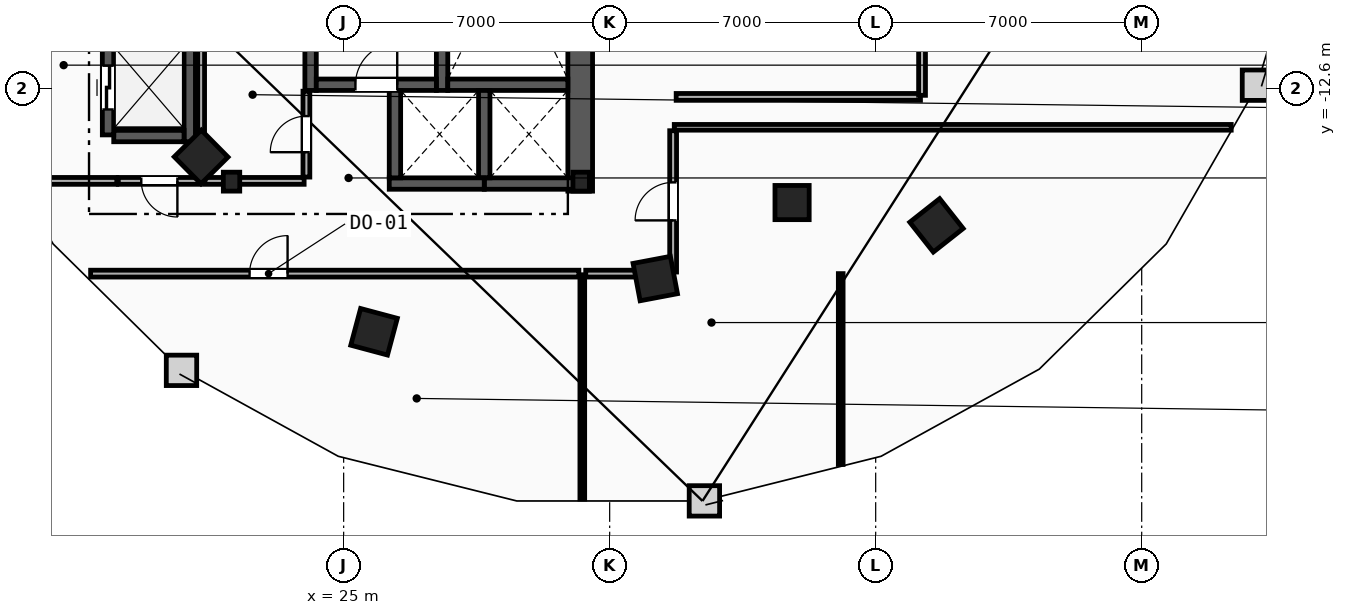
"""IFC4 building model, lengths in metres.
Left out: names, types, materials, properties, quantities, classifications, styles, units other than length and angle.
Written with IfcOpenShell. Run it as: python <this file> out.ifc"""

import sys

from ifc_helpers import new_model, si_unit, direction, frame, frame_2d, origin, origin_2d, place, context, subcontext, project, spatial, rectangle, i_section, extrude, element, fill, save


model = new_model("IFC4")
c1 = context("Model", 3, precision=1e-05, world=origin(), true_north=direction((0.0, 1.0)))
c2 = subcontext(c1, "Body", "Model", "MODEL_VIEW")
j1 = project(units=[si_unit("LENGTHUNIT", "METRE"), si_unit("PLANEANGLEUNIT", "RADIAN")], contexts=[c1])
p1 = place(None, origin())
s1 = spatial("IfcSite", under=j1, at=p1, CompositionType="ELEMENT")
p2 = place(p1, origin())
s2 = spatial("IfcBuilding", under=s1, at=p2, CompositionType="ELEMENT")
p3 = place(p2, frame((0.0, 0.0, 162.0)))
s3 = spatial("IfcBuildingStorey", under=s2, at=p3, CompositionType="ELEMENT", Elevation=162.0)
for number, where, z_axis, x_axis in (
    (1, (22.05, -15.05, 0.0), (0.0, 0.0, 1.0), (1.0, 0.0, 0.0)),
    (2, (31.25, -15.05, 0.0), (0.0, 0.0, 1.0), (1.0, 0.0, 0.0)),
):
    element("IfcColumn", number, at=place(p3, frame(where, z_axis=z_axis, x_axis=x_axis)), inside=s3, PredefinedType="COLUMN", context=c2, shape_type="SweptSolid", body=[
        extrude(i_section(OverallWidth=0.432, OverallDepth=0.498, WebThickness=0.056, FlangeThickness=0.089, FilletRadius=0.018, at=origin_2d()), origin(), (0.0, 0.0, 1.0), 3.6),
    ])
p4 = place(p3, frame((36.8, -15.6, 0.0), z_axis=(0.0, 0.0, 1.0), x_axis=(1.0, 0.0, 0.0)))
e3 = element("IfcColumn", 3, at=p4, inside=s3, PredefinedType="COLUMN", context=c2, shape_type="SweptSolid", body=[
    extrude(rectangle(XDim=0.9, YDim=0.9, at=origin_2d()), origin(), (0.0, 0.0, 1.0), 3.6),
])
for number, where, z_axis, x_axis in (
    (4, (21.25, -14.4, 0.0), (0.0, 0.0, 1.0), (0.703, -0.711, 0.0)),
    (5, (25.8, -19.0, 0.0), (0.0, 0.0, 1.0), (0.966, -0.259, 0.0)),
    (6, (33.2, -17.6, 0.0), (0.0, 0.0, 1.0), (0.983, 0.186, 0.0)),
    (7, (40.6, -16.2, 0.0), (0.0, 0.0, 1.0), (0.785, 0.619, 0.0)),
):
    element("IfcColumn", number, at=place(p3, frame(where, z_axis=z_axis, x_axis=x_axis)), inside=s3, PredefinedType="COLUMN", context=c2, shape_type="SweptSolid", body=[
        extrude(rectangle(XDim=1.0, YDim=1.0, at=origin_2d()), origin(), (0.0, 0.0, 1.0), 3.6),
    ])
p5 = place(p3, frame((31.225, -15.3, 0.0), z_axis=(0.0, 0.0, 1.0), x_axis=(0.0, 1.0, 0.0)))
e8 = element("IfcWall", 8, at=p5, inside=s3, PredefinedType="SHEAR", context=c2, shape_type="SweptSolid", body=[
    extrude(rectangle(XDim=13.33, YDim=0.65, at=frame_2d((6.665, 0.0))), origin(), (0.0, 0.0, 1.0), 3.36),
])
for number, where, z_axis, x_axis in (
    (9, (27.59, -12.65, 0.0), (0.0, 0.0, 1.0), (0.0, 1.0, 0.0)),
    (10, (24.13, -12.65, 0.0), (0.0, 0.0, 1.0), (0.0, 1.0, 0.0)),
):
    element("IfcWall", number, at=place(p3, frame(where, z_axis=z_axis, x_axis=x_axis)), inside=s3, PredefinedType="SHEAR", context=c2, shape_type="SweptSolid", body=[
        extrude(rectangle(XDim=10.68, YDim=0.3, at=frame_2d((5.34, 0.0))), origin(), (0.0, 0.0, 1.0), 3.36),
    ])
p6 = place(p3, frame((27.74, -12.5, 0.0), z_axis=(0.0, 0.0, 1.0), x_axis=(1.0, 0.0, 0.0)))
e11 = element("IfcWall", 11, at=p6, inside=s3, PredefinedType="SHEAR", context=c2, shape_type="SweptSolid", body=[
    extrude(rectangle(XDim=3.16, YDim=0.3, at=frame_2d((1.58, 0.0))), origin(), (0.0, 0.0, 1.0), 3.36),
])
p7 = place(p3, frame((24.28, -12.5, 0.0), z_axis=(0.0, 0.0, 1.0), x_axis=(1.0, 0.0, 0.0)))
e12 = element("IfcWall", 12, at=p7, inside=s3, PredefinedType="SHEAR", context=c2, shape_type="SweptSolid", body=[
    extrude(rectangle(XDim=3.16, YDim=0.3, at=frame_2d((1.58, 0.0))), origin(), (0.0, 0.0, 1.0), 3.36),
])
p8 = place(p7, frame((1.03, 0.0, 0.0)))
e13 = element("IfcOpeningElement", 13, at=p8, cuts=e12, PredefinedType="OPENING", context=c2, shape_type="SweptSolid", body=[
    extrude(rectangle(XDim=1.1, YDim=2.15, at=frame_2d((0.55, 1.075))), frame((0.0, 0.16, 0.0), z_axis=(0.0, -1.0, 0.0), x_axis=(1.0, 0.0, 0.0)), (0.0, 0.0, 1.0), 0.32),
])
p9 = place(p3, frame((28.7, -15.1, 0.0), z_axis=(0.0, 0.0, 1.0), x_axis=(1.0, 0.0, 0.0)))
e14 = element("IfcWall", 14, at=p9, inside=s3, PredefinedType="SHEAR", context=c2, shape_type="SweptSolid", body=[
    extrude(rectangle(XDim=2.5, YDim=0.3, at=frame_2d((1.25, 0.0))), origin(), (0.0, 0.0, 1.0), 3.36),
])
p10 = place(p3, frame((28.7, -14.95, 0.0), z_axis=(0.0, 0.0, 1.0), x_axis=(0.0, 1.0, 0.0)))
e15 = element("IfcWall", 15, at=p10, inside=s3, PredefinedType="SHEAR", context=c2, shape_type="SweptSolid", body=[
    extrude(rectangle(XDim=2.3, YDim=0.3, at=frame_2d((1.15, 0.0))), origin(), (0.0, 0.0, 1.0), 3.36),
])
p11 = place(p3, frame((26.2, -15.1, 0.0), z_axis=(0.0, 0.0, 1.0), x_axis=(1.0, 0.0, 0.0)))
e16 = element("IfcWall", 16, at=p11, inside=s3, PredefinedType="SHEAR", context=c2, shape_type="SweptSolid", body=[
    extrude(rectangle(XDim=2.5, YDim=0.3, at=frame_2d((1.25, 0.0))), origin(), (0.0, 0.0, 1.0), 3.36),
])
p12 = place(p3, frame((26.35, -14.95, 0.0), z_axis=(0.0, 0.0, 1.0), x_axis=(0.0, 1.0, 0.0)))
e17 = element("IfcWall", 17, at=p12, inside=s3, PredefinedType="SHEAR", context=c2, shape_type="SweptSolid", body=[
    extrude(rectangle(XDim=2.3, YDim=0.3, at=frame_2d((1.15, 0.0))), origin(), (0.0, 0.0, 1.0), 3.36),
])
p13 = place(p3, frame((20.95, -14.0, 0.0), z_axis=(0.0, 0.0, 1.0), x_axis=(0.0, 1.0, 0.0)))
e18 = element("IfcWall", 18, at=p13, inside=s3, PredefinedType="SHEAR", context=c2, shape_type="SweptSolid", body=[
    extrude(rectangle(XDim=5.25, YDim=0.3, at=frame_2d((2.625, 0.0))), origin(), (0.0, 0.0, 1.0), 3.36),
])
p14 = place(p3, frame((18.95, -13.85, 0.0), z_axis=(0.0, 0.0, 1.0), x_axis=(1.0, 0.0, 0.0)))
e19 = element("IfcWall", 19, at=p14, inside=s3, PredefinedType="SHEAR", context=c2, shape_type="SweptSolid", body=[
    extrude(rectangle(XDim=1.85, YDim=0.3, at=frame_2d((0.925, 0.0))), origin(), (0.0, 0.0, 1.0), 3.36),
])
p15 = place(p3, frame((18.8, -13.82, 0.0), z_axis=(0.0, 0.0, 1.0), x_axis=(0.0, 1.0, 0.0)))
e20 = element("IfcWall", 20, at=p15, inside=s3, PredefinedType="SHEAR", context=c2, shape_type="SweptSolid", body=[
    extrude(rectangle(XDim=2.49, YDim=0.3, at=frame_2d((1.245, 0.0))), origin(), (0.0, 0.0, 1.0), 3.36),
])
p16 = place(p15, frame((0.67, 0.0, 0.0)))
e21 = element("IfcOpeningElement", 21, at=p16, cuts=e20, PredefinedType="OPENING", context=c2, shape_type="SweptSolid", body=[
    extrude(rectangle(XDim=1.15, YDim=2.2, at=frame_2d((0.575, 1.1))), frame((0.0, 0.16, 0.0), z_axis=(0.0, -1.0, 0.0), x_axis=(1.0, 0.0, 0.0)), (0.0, 0.0, 1.0), 0.32),
])
p17 = place(p3, frame((17.04, -15.03, 0.0), z_axis=(0.0, 0.0, 1.0), x_axis=(1.0, 0.0, 0.0)))
e22 = element("IfcWall", 22, at=p17, inside=s3, PredefinedType="PARTITIONING", context=c2, shape_type="SweptSolid", body=[
    extrude(rectangle(XDim=1.99, YDim=0.18, at=frame_2d((0.995, 0.0))), origin(), (0.0, 0.0, 1.0), 3.36),
])
p18 = place(p3, frame((21.23, -15.03, 0.0), z_axis=(0.0, 0.0, 1.0), x_axis=(-1.0, 0.0, 0.0)))
e23 = element("IfcWall", 23, at=p18, inside=s3, PredefinedType="PARTITIONING", context=c2, shape_type="SweptSolid", body=[
    extrude(rectangle(XDim=2.16, YDim=0.18, at=frame_2d((1.08, 0.0))), origin(), (0.0, 0.0, 1.0), 3.36),
])
p19 = place(p18, frame((0.605, 0.0, 0.0)))
e24 = element("IfcOpeningElement", 24, at=p19, cuts=e23, PredefinedType="OPENING", context=c2, shape_type="SweptSolid", body=[
    extrude(rectangle(XDim=0.95, YDim=2.1, at=frame_2d((0.475, 1.05))), frame((0.0, 0.1, 0.0), z_axis=(0.0, -1.0, 0.0), x_axis=(1.0, 0.0, 0.0)), (0.0, 0.0, 1.0), 0.2),
])
p20 = place(p3, frame((21.25, -14.93, 0.0), z_axis=(0.0, 0.0, 1.0), x_axis=(0.0, 1.0, 0.0)))
e25 = element("IfcWall", 25, at=p20, inside=s3, PredefinedType="PARTITIONING", context=c2, shape_type="SweptSolid", body=[
    extrude(rectangle(XDim=4.36, YDim=0.18, at=frame_2d((2.18, 0.0))), origin(), (0.0, 0.0, 1.0), 3.36),
])
p21 = place(p3, frame((21.35, -15.03, 0.0), z_axis=(0.0, 0.0, 1.0), x_axis=(1.0, 0.0, 0.0)))
e26 = element("IfcWall", 26, at=p21, inside=s3, PredefinedType="PARTITIONING", context=c2, shape_type="SweptSolid", body=[
    extrude(rectangle(XDim=2.61, YDim=0.18, at=frame_2d((1.305, 0.0))), origin(), (0.0, 0.0, 1.0), 2.433),
])
p22 = place(p3, frame((24.02, -14.93, 0.0), z_axis=(0.0, 0.0, 1.0), x_axis=(0.0, 1.0, 0.0)))
e27 = element("IfcWall", 27, at=p22, inside=s3, PredefinedType="PARTITIONING", context=c2, shape_type="SweptSolid", body=[
    extrude(rectangle(XDim=2.26, YDim=0.18, at=frame_2d((1.13, 0.0))), origin(), (0.0, 0.0, 1.0), 3.36),
])
p23 = place(p22, frame((0.655, 0.0, 0.0)))
e28 = element("IfcOpeningElement", 28, at=p23, cuts=e27, PredefinedType="OPENING", context=c2, shape_type="SweptSolid", body=[
    extrude(rectangle(XDim=0.95, YDim=2.1, at=frame_2d((0.475, 1.05))), frame((0.0, 0.1, 0.0), z_axis=(0.0, -1.0, 0.0), x_axis=(1.0, 0.0, 0.0)), (0.0, 0.0, 1.0), 0.2),
])
p24 = place(p3, frame((33.7, -13.62, 0.0), z_axis=(0.0, 0.0, 1.0), x_axis=(1.0, 0.0, 0.0)))
e29 = element("IfcWall", 29, at=p24, inside=s3, PredefinedType="PARTITIONING", context=c2, shape_type="SweptSolid", body=[
    extrude(rectangle(XDim=14.656, YDim=0.15, at=frame_2d((7.328, 0.0))), origin(), (0.0, 0.0, 1.0), 3.36),
])
p25 = place(p3, frame((31.28, -23.402, 0.0), z_axis=(0.0, 0.0, 1.0), x_axis=(0.0, 1.0, 0.0)))
e30 = element("IfcWall", 30, at=p25, inside=s3, PredefinedType="PARTITIONING", context=c2, shape_type="SweptSolid", body=[
    extrude(rectangle(XDim=5.902, YDim=0.125, at=frame_2d((2.951, 0.0))), origin(), (0.0, 0.0, 1.0), 3.36),
])
p26 = place(p3, frame((38.08, -22.491, 0.0), z_axis=(0.0, 0.0, 1.0), x_axis=(0.0, 1.0, 0.0)))
e31 = element("IfcWall", 31, at=p26, inside=s3, PredefinedType="PARTITIONING", context=c2, shape_type="SweptSolid", body=[
    extrude(rectangle(XDim=5.021, YDim=0.125, at=frame_2d((2.511, 0.0))), origin(), (0.0, 0.0, 1.0), 3.36),
])
p27 = place(p3, frame((18.342, -17.47, 0.0), z_axis=(0.0, 0.0, 1.0), x_axis=(1.0, 0.0, 0.0)))
e32 = element("IfcWall", 32, at=p27, inside=s3, PredefinedType="PARTITIONING", context=c2, shape_type="SweptSolid", body=[
    extrude(rectangle(XDim=12.848, YDim=0.18, at=frame_2d((6.424, 0.0))), origin(), (0.0, 0.0, 1.0), 3.36),
])
p28 = place(p27, frame((4.183, 0.0, 0.0)))
e33 = element("IfcOpeningElement", 33, at=p28, cuts=e32, PredefinedType="OPENING", context=c2, shape_type="SweptSolid", body=[
    extrude(rectangle(XDim=1.0, YDim=2.15, at=frame_2d((0.5, 1.075))), frame((0.0, 0.1, 0.0), z_axis=(0.0, -1.0, 0.0), x_axis=(1.0, 0.0, 0.0)), (0.0, 0.0, 1.0), 0.2),
])
p29 = place(p3, frame((33.67, -17.428, 0.0), z_axis=(0.0, 0.0, 1.0), x_axis=(0.0, 1.0, 0.0)))
e34 = element("IfcWall", 34, at=p29, inside=s3, PredefinedType="PARTITIONING", context=c2, shape_type="SweptSolid", body=[
    extrude(rectangle(XDim=3.719, YDim=0.18, at=frame_2d((1.859, 0.0))), origin(), (0.0, 0.0, 1.0), 3.36),
])
p30 = place(p29, frame((1.359, 0.0, 0.0)))
e35 = element("IfcOpeningElement", 35, at=p30, cuts=e34, PredefinedType="OPENING", context=c2, shape_type="SweptSolid", body=[
    extrude(rectangle(XDim=1.0, YDim=2.15, at=frame_2d((0.5, 1.075))), frame((0.0, 0.1, 0.0), z_axis=(0.0, -1.0, 0.0), x_axis=(1.0, 0.0, 0.0)), (0.0, 0.0, 1.0), 0.2),
])
p31 = place(p3, frame((31.37, -17.47, 0.0), z_axis=(0.0, 0.0, 1.0), x_axis=(1.0, 0.0, 0.0)))
e36 = element("IfcWall", 36, at=p31, inside=s3, PredefinedType="PARTITIONING", context=c2, shape_type="SweptSolid", body=[
    extrude(rectangle(XDim=2.258, YDim=0.18, at=frame_2d((1.129, 0.0))), origin(), (0.0, 0.0, 1.0), 3.36),
])
p32 = place(p3, frame((33.75, -12.82, 0.0), z_axis=(0.0, 0.0, 1.0), x_axis=(1.0, 0.0, 0.0)))
e37 = element("IfcWall", 37, at=p32, inside=s3, PredefinedType="PARTITIONING", context=c2, shape_type="SweptSolid", body=[
    extrude(rectangle(XDim=6.428, YDim=0.18, at=frame_2d((3.214, 0.0))), origin(), (0.0, 0.0, 1.0), 3.36),
])
p33 = place(p3, frame((40.22, -12.779, 0.0), z_axis=(0.0, 0.0, 1.0), x_axis=(0.0, 1.0, 0.0)))
e38 = element("IfcWall", 38, at=p33, inside=s3, PredefinedType="PARTITIONING", context=c2, shape_type="SweptSolid", body=[
    extrude(rectangle(XDim=2.357, YDim=0.18, at=frame_2d((1.179, 0.0))), origin(), (0.0, 0.0, 1.0), 3.36),
])
p34 = place(p8, origin())
e39 = element("IfcDoor", 39, at=p34, inside=s3, OperationType="SINGLE_SWING_RIGHT", PredefinedType="DOOR", context=c2, shape_type="SweptSolid", body=[
    extrude(rectangle(XDim=1.1, YDim=2.15, at=frame_2d((0.55, 1.075))), frame((0.0, 0.025, 0.0), z_axis=(0.0, -1.0, 0.0), x_axis=(1.0, 0.0, 0.0)), (0.0, 0.0, 1.0), 0.05),
])
fill(e13, e39)
p35 = place(p16, origin())
e40 = element("IfcDoor", 40, at=p35, inside=s3, OperationType="SLIDING_TO_LEFT", PredefinedType="TRAPDOOR", context=c2, shape_type="SweptSolid", body=[
    extrude(rectangle(XDim=1.15, YDim=2.2, at=frame_2d((0.575, 1.1))), frame((0.0, 0.025, 0.0), z_axis=(0.0, -1.0, 0.0), x_axis=(1.0, 0.0, 0.0)), (0.0, 0.0, 1.0), 0.05),
])
fill(e21, e40)
p36 = place(p28, origin())
e41 = element("IfcDoor", 41, at=p36, inside=s3, OperationType="SINGLE_SWING_RIGHT", PredefinedType="DOOR", context=c2, shape_type="SweptSolid", body=[
    extrude(rectangle(XDim=1.0, YDim=2.15, at=frame_2d((0.5, 1.075))), frame((0.0, 0.025, 0.0), z_axis=(0.0, -1.0, 0.0), x_axis=(1.0, 0.0, 0.0)), (0.0, 0.0, 1.0), 0.05),
])
fill(e33, e41)
p37 = place(p30, origin())
e42 = element("IfcDoor", 42, at=p37, inside=s3, OperationType="SINGLE_SWING_LEFT", PredefinedType="DOOR", context=c2, shape_type="SweptSolid", body=[
    extrude(rectangle(XDim=1.0, YDim=2.15, at=frame_2d((0.5, 1.075))), frame((0.0, 0.025, 0.0), z_axis=(0.0, -1.0, 0.0), x_axis=(1.0, 0.0, 0.0)), (0.0, 0.0, 1.0), 0.05),
])
fill(e35, e42)
p38 = place(p23, origin())
e43 = element("IfcDoor", 43, at=p38, inside=s3, OperationType="SINGLE_SWING_LEFT", PredefinedType="DOOR", context=c2, shape_type="SweptSolid", body=[
    extrude(rectangle(XDim=0.95, YDim=2.1, at=frame_2d((0.475, 1.05))), frame((0.0, 0.025, 0.0), z_axis=(0.0, -1.0, 0.0), x_axis=(1.0, 0.0, 0.0)), (0.0, 0.0, 1.0), 0.05),
])
fill(e28, e43)
p39 = place(p19, origin())
e44 = element("IfcDoor", 44, at=p39, inside=s3, OperationType="SINGLE_SWING_LEFT", PredefinedType="DOOR", context=c2, shape_type="SweptSolid", body=[
    extrude(rectangle(XDim=0.95, YDim=2.1, at=frame_2d((0.475, 1.05))), frame((0.0, 0.025, 0.0), z_axis=(0.0, -1.0, 0.0), x_axis=(1.0, 0.0, 0.0)), (0.0, 0.0, 1.0), 0.05),
])
fill(e24, e44)
save(model, sys.argv[1])
